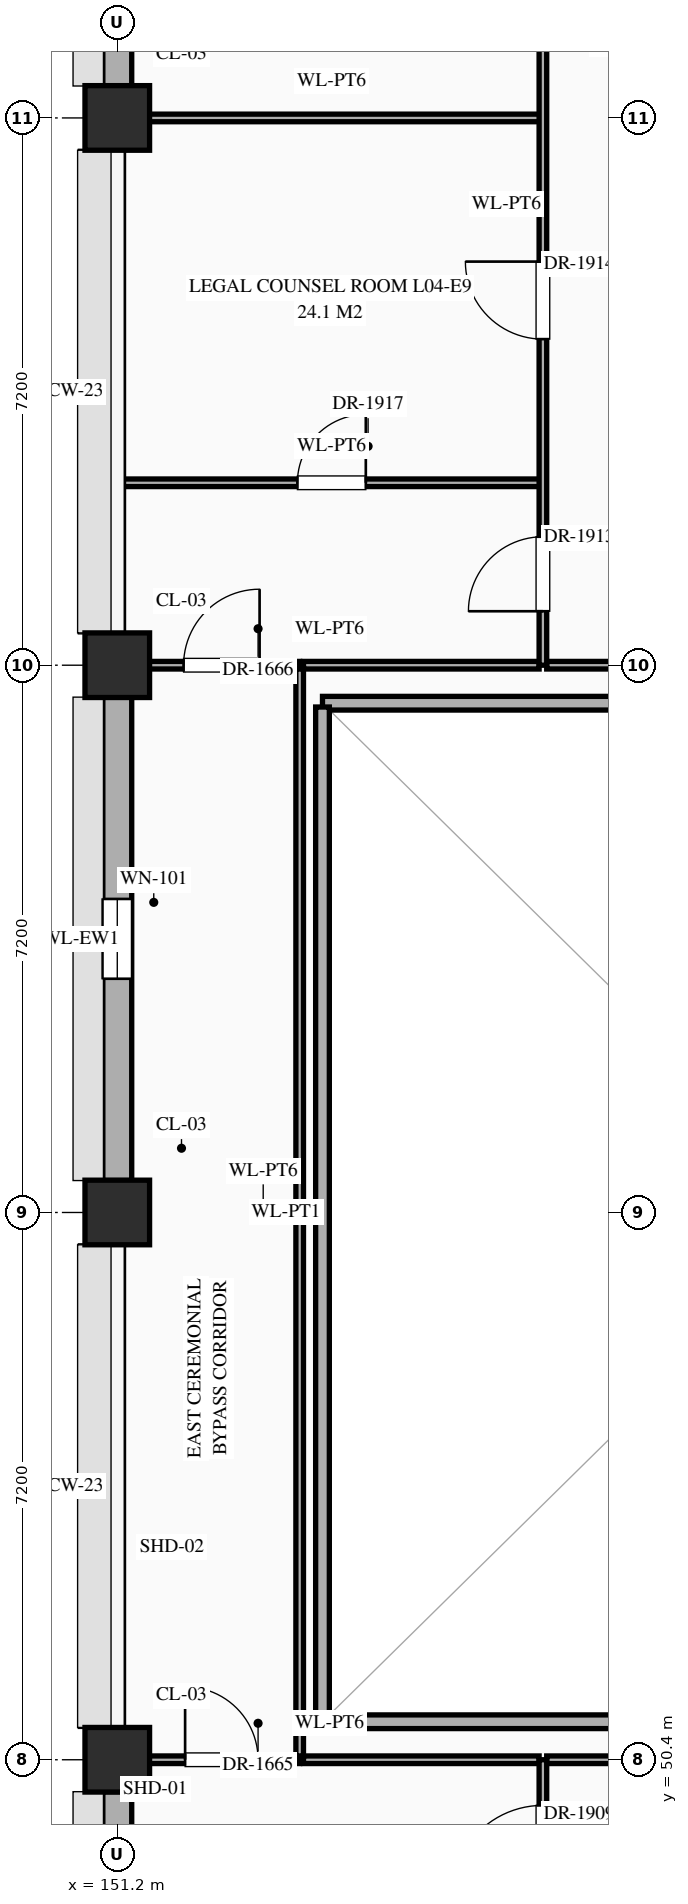
"""IFC4 building model, lengths in metres.
Left out: names, types, materials, properties, quantities, classifications, styles, units other than length and angle.
Written with IfcOpenShell. Run it as: python <this file> out.ifc"""

import sys

from ifc_helpers import new_model, si_unit, direction, frame, frame_2d, origin, origin_2d, place, context, subcontext, project, spatial, rectangle, extrude, element, fill, save


model = new_model("IFC4")
c1 = context("Model", 3, precision=1e-05, world=origin(), true_north=direction((0.0, 1.0)))
c2 = subcontext(c1, "Body", "Model", "MODEL_VIEW")
j1 = project(units=[si_unit("LENGTHUNIT", "METRE"), si_unit("PLANEANGLEUNIT", "RADIAN")], contexts=[c1])
p1 = place(None, origin())
s1 = spatial("IfcSite", under=j1, at=p1, CompositionType="ELEMENT")
p2 = place(p1, origin())
s2 = spatial("IfcBuilding", under=s1, at=p2, CompositionType="ELEMENT")
p3 = place(p2, frame((0.0, 0.0, 16.2)))
s3 = spatial("IfcBuildingStorey", under=s2, at=p3, CompositionType="ELEMENT", Elevation=16.2)
for number, where, z_axis, x_axis in (
    (1, (151.2, 50.4, 0.0), (0.0, 0.0, 1.0), (1.0, 0.0, 0.0)),
    (2, (151.2, 57.6, 0.0), (0.0, 0.0, 1.0), (1.0, 0.0, 0.0)),
    (3, (151.2, 64.8, 0.0), (0.0, 0.0, 1.0), (1.0, 0.0, 0.0)),
    (4, (151.2, 72.0, 0.0), (0.0, 0.0, 1.0), (1.0, 0.0, 0.0)),
):
    element("IfcColumn", number, at=place(p3, frame(where, z_axis=z_axis, x_axis=x_axis)), inside=s3, PredefinedType="COLUMN", context=c2, shape_type="SweptSolid", body=[
        extrude(rectangle(XDim=0.85, YDim=0.85, at=origin_2d()), origin(), (0.0, 0.0, 1.0), 5.4),
    ])
p4 = place(p3, frame((151.2, 43.62, 0.0), z_axis=(0.0, 0.0, 1.0), x_axis=(0.0, 1.0, 0.0)))
e5 = element("IfcWall", 5, at=p4, inside=s3, PredefinedType="STANDARD", context=c2, shape_type="SweptSolid", body=[
    extrude(rectangle(XDim=6.36, YDim=0.38, at=frame_2d((3.18, 0.0))), origin(), (0.0, 0.0, 1.0), 4.55),
])
p5 = place(p4, frame((2.655, 0.0, 0.85)))
e6 = element("IfcOpeningElement", 6, at=p5, cuts=e5, PredefinedType="OPENING", context=c2, shape_type="SweptSolid", body=[
    extrude(rectangle(XDim=1.05, YDim=1.2, at=frame_2d((0.525, 0.6))), frame((0.0, 0.202, 0.0), z_axis=(0.0, -1.0, 0.0), x_axis=(1.0, 0.0, 0.0)), (0.0, 0.0, 1.0), 0.404),
])
p6 = place(p3, frame((151.2, 58.02, 0.0), z_axis=(0.0, 0.0, 1.0), x_axis=(0.0, 1.0, 0.0)))
e7 = element("IfcWall", 7, at=p6, inside=s3, PredefinedType="STANDARD", context=c2, shape_type="SweptSolid", body=[
    extrude(rectangle(XDim=6.36, YDim=0.38, at=frame_2d((3.18, 0.0))), origin(), (0.0, 0.0, 1.0), 4.55),
])
p7 = place(p6, frame((2.655, 0.0, 0.85)))
e8 = element("IfcOpeningElement", 8, at=p7, cuts=e7, PredefinedType="OPENING", context=c2, shape_type="SweptSolid", body=[
    extrude(rectangle(XDim=1.05, YDim=1.56, at=frame_2d((0.525, 0.78))), frame((0.0, 0.202, 0.0), z_axis=(0.0, -1.0, 0.0), x_axis=(1.0, 0.0, 0.0)), (0.0, 0.0, 1.0), 0.404),
])
p8 = place(p3, frame((151.2, 72.42, 0.0), z_axis=(0.0, 0.0, 1.0), x_axis=(0.0, 1.0, 0.0)))
e9 = element("IfcWall", 9, at=p8, inside=s3, PredefinedType="STANDARD", context=c2, shape_type="SweptSolid", body=[
    extrude(rectangle(XDim=6.36, YDim=0.38, at=frame_2d((3.18, 0.0))), origin(), (0.0, 0.0, 1.0), 4.55),
])
p9 = place(p8, frame((2.655, 0.0, 0.85)))
e10 = element("IfcOpeningElement", 10, at=p9, cuts=e9, PredefinedType="OPENING", context=c2, shape_type="SweptSolid", body=[
    extrude(rectangle(XDim=1.05, YDim=1.92, at=frame_2d((0.525, 0.96))), frame((0.0, 0.202, 0.0), z_axis=(0.0, -1.0, 0.0), x_axis=(1.0, 0.0, 0.0)), (0.0, 0.0, 1.0), 0.404),
])
p10 = place(p3, frame((151.24, 50.4, 0.0), z_axis=(0.0, 0.0, 1.0), x_axis=(1.0, 0.0, 0.0)))
e11 = element("IfcWall", 11, at=p10, inside=s3, PredefinedType="STANDARD", context=c2, shape_type="SweptSolid", body=[
    extrude(rectangle(XDim=2.36, YDim=0.1, at=frame_2d((1.18, 0.0))), origin(), (0.0, 0.0, 1.0), 4.15),
])
p11 = place(p10, frame((0.853, 0.0, 0.0)))
e12 = element("IfcOpeningElement", 12, at=p11, cuts=e11, PredefinedType="OPENING", context=c2, shape_type="SweptSolid", body=[
    extrude(rectangle(XDim=0.96, YDim=2.2, at=frame_2d((0.48, 1.1))), frame((0.0, 0.062, 0.0), z_axis=(0.0, -1.0, 0.0), x_axis=(1.0, 0.0, 0.0)), (0.0, 0.0, 1.0), 0.124),
])
p12 = place(p3, frame((153.65, 50.4, 0.0), z_axis=(0.0, 0.0, 1.0), x_axis=(1.0, 0.0, 0.0)))
e13 = element("IfcWall", 13, at=p12, inside=s3, PredefinedType="STANDARD", context=c2, shape_type="SweptSolid", body=[
    extrude(rectangle(XDim=3.1, YDim=0.1, at=frame_2d((1.55, 0.0))), origin(), (0.0, 0.0, 1.0), 4.15),
])
p13 = place(p3, frame((156.85, 50.4, 0.0), z_axis=(0.0, 0.0, 1.0), x_axis=(1.0, 0.0, 0.0)))
e14 = element("IfcWall", 14, at=p13, inside=s3, PredefinedType="STANDARD", context=c2, shape_type="SweptSolid", body=[
    extrude(rectangle(XDim=2.7, YDim=0.1, at=frame_2d((1.35, 0.0))), origin(), (0.0, 0.0, 1.0), 4.15),
])
for number, where, z_axis, x_axis in (
    (15, (153.9, 50.9, 0.0), (0.0, 0.0, 1.0), (1.0, 0.0, 0.0)),
    (16, (153.9, 64.3, 0.0), (0.0, 0.0, 1.0), (1.0, 0.0, 0.0)),
):
    element("IfcWall", number, at=place(p3, frame(where, z_axis=z_axis, x_axis=x_axis)), inside=s3, PredefinedType="STANDARD", context=c2, shape_type="SweptSolid", body=[
        extrude(rectangle(XDim=13.6, YDim=0.18, at=frame_2d((6.8, 0.0))), origin(), (0.0, 0.0, 1.0), 5.2),
    ])
p14 = place(p3, frame((151.24, 64.8, 0.0), z_axis=(0.0, 0.0, 1.0), x_axis=(1.0, 0.0, 0.0)))
e17 = element("IfcWall", 17, at=p14, inside=s3, PredefinedType="STANDARD", context=c2, shape_type="SweptSolid", body=[
    extrude(rectangle(XDim=2.36, YDim=0.1, at=frame_2d((1.18, 0.0))), origin(), (0.0, 0.0, 1.0), 4.15),
])
p15 = place(p14, frame((0.833, 0.0, 0.0)))
e18 = element("IfcOpeningElement", 18, at=p15, cuts=e17, PredefinedType="OPENING", context=c2, shape_type="SweptSolid", body=[
    extrude(rectangle(XDim=1.0, YDim=2.25, at=frame_2d((0.5, 1.125))), frame((0.0, 0.062, 0.0), z_axis=(0.0, -1.0, 0.0), x_axis=(1.0, 0.0, 0.0)), (0.0, 0.0, 1.0), 0.124),
])
p16 = place(p3, frame((153.65, 64.8, 0.0), z_axis=(0.0, 0.0, 1.0), x_axis=(1.0, 0.0, 0.0)))
e19 = element("IfcWall", 19, at=p16, inside=s3, PredefinedType="STANDARD", context=c2, shape_type="SweptSolid", body=[
    extrude(rectangle(XDim=3.1, YDim=0.1, at=frame_2d((1.55, 0.0))), origin(), (0.0, 0.0, 1.0), 4.15),
])
p17 = place(p3, frame((156.85, 64.8, 0.0), z_axis=(0.0, 0.0, 1.0), x_axis=(1.0, 0.0, 0.0)))
e20 = element("IfcWall", 20, at=p17, inside=s3, PredefinedType="STANDARD", context=c2, shape_type="SweptSolid", body=[
    extrude(rectangle(XDim=2.7, YDim=0.1, at=frame_2d((1.35, 0.0))), origin(), (0.0, 0.0, 1.0), 4.15),
])
p18 = place(p3, frame((151.24, 67.2, 0.0), z_axis=(0.0, 0.0, 1.0), x_axis=(1.0, 0.0, 0.0)))
e21 = element("IfcWall", 21, at=p18, inside=s3, PredefinedType="STANDARD", context=c2, shape_type="SweptSolid", body=[
    extrude(rectangle(XDim=5.56, YDim=0.1, at=frame_2d((2.78, 0.0))), origin(), (0.0, 0.0, 1.0), 5.2),
])
p19 = place(p18, frame((2.33, 0.0, 0.0)))
e22 = element("IfcOpeningElement", 22, at=p19, cuts=e21, PredefinedType="OPENING", context=c2, shape_type="SweptSolid", body=[
    extrude(rectangle(XDim=0.9, YDim=2.15, at=frame_2d((0.45, 1.075))), frame((0.0, 0.062, 0.0), z_axis=(0.0, -1.0, 0.0), x_axis=(1.0, 0.0, 0.0)), (0.0, 0.0, 1.0), 0.124),
])
p20 = place(p3, frame((151.24, 72.0, 0.0), z_axis=(0.0, 0.0, 1.0), x_axis=(1.0, 0.0, 0.0)))
e23 = element("IfcWall", 23, at=p20, inside=s3, PredefinedType="STANDARD", context=c2, shape_type="SweptSolid", body=[
    extrude(rectangle(XDim=5.56, YDim=0.1, at=frame_2d((2.78, 0.0))), origin(), (0.0, 0.0, 1.0), 4.15),
])
p21 = place(p3, frame((153.6, 50.45, 0.0), z_axis=(0.0, 0.0, 1.0), x_axis=(0.0, 1.0, 0.0)))
e24 = element("IfcWall", 24, at=p21, inside=s3, PredefinedType="STANDARD", context=c2, shape_type="SweptSolid", body=[
    extrude(rectangle(XDim=14.3, YDim=0.1, at=frame_2d((7.15, 0.0))), origin(), (0.0, 0.0, 1.0), 5.2),
])
p22 = place(p3, frame((153.9, 50.95, 0.0), z_axis=(0.0, 0.0, 1.0), x_axis=(0.0, 1.0, 0.0)))
e25 = element("IfcWall", 25, at=p22, inside=s3, PredefinedType="STANDARD", context=c2, shape_type="SweptSolid", body=[
    extrude(rectangle(XDim=13.3, YDim=0.18, at=frame_2d((6.65, 0.0))), origin(), (0.0, 0.0, 1.0), 5.2),
])
p23 = place(p3, frame((156.8, 43.2, 0.0), z_axis=(0.0, 0.0, 1.0), x_axis=(0.0, 1.0, 0.0)))
e26 = element("IfcWall", 26, at=p23, inside=s3, PredefinedType="STANDARD", context=c2, shape_type="SweptSolid", body=[
    extrude(rectangle(XDim=7.2, YDim=0.1, at=frame_2d((3.6, 0.0))), origin(), (0.0, 0.0, 1.0), 5.2),
])
p24 = place(p23, frame((5.4, 0.0, 0.0)))
e27 = element("IfcOpeningElement", 27, at=p24, cuts=e26, PredefinedType="OPENING", context=c2, shape_type="SweptSolid", body=[
    extrude(rectangle(XDim=1.2, YDim=2.35, at=frame_2d((0.6, 1.175))), frame((0.0, 0.062, 0.0), z_axis=(0.0, -1.0, 0.0), x_axis=(1.0, 0.0, 0.0)), (0.0, 0.0, 1.0), 0.124),
])
p25 = place(p23, frame((1.78, 0.0, 0.0)))
e28 = element("IfcOpeningElement", 28, at=p25, cuts=e26, PredefinedType="OPENING", context=c2, shape_type="SweptSolid", body=[
    extrude(rectangle(XDim=1.24, YDim=2.3, at=frame_2d((0.62, 1.15))), frame((0.0, 0.062, 0.0), z_axis=(0.0, -1.0, 0.0), x_axis=(1.0, 0.0, 0.0)), (0.0, 0.0, 1.0), 0.124),
])
p26 = place(p3, frame((156.8, 64.8, 0.0), z_axis=(0.0, 0.0, 1.0), x_axis=(0.0, 1.0, 0.0)))
e29 = element("IfcWall", 29, at=p26, inside=s3, PredefinedType="STANDARD", context=c2, shape_type="SweptSolid", body=[
    extrude(rectangle(XDim=19.2, YDim=0.1, at=frame_2d((9.6, 0.0))), origin(), (0.0, 0.0, 1.0), 5.2),
])
p27 = place(p26, frame((16.31, 0.0, 0.0)))
e30 = element("IfcOpeningElement", 30, at=p27, cuts=e29, PredefinedType="OPENING", context=c2, shape_type="SweptSolid", body=[
    extrude(rectangle(XDim=0.98, YDim=2.35, at=frame_2d((0.49, 1.175))), frame((0.0, 0.062, 0.0), z_axis=(0.0, -1.0, 0.0), x_axis=(1.0, 0.0, 0.0)), (0.0, 0.0, 1.0), 0.124),
])
p28 = place(p26, frame((0.71, 0.0, 0.0)))
e31 = element("IfcOpeningElement", 31, at=p28, cuts=e29, PredefinedType="OPENING", context=c2, shape_type="SweptSolid", body=[
    extrude(rectangle(XDim=0.98, YDim=2.35, at=frame_2d((0.49, 1.175))), frame((0.0, 0.062, 0.0), z_axis=(0.0, -1.0, 0.0), x_axis=(1.0, 0.0, 0.0)), (0.0, 0.0, 1.0), 0.124),
])
p29 = place(p26, frame((4.29, 0.0, 0.0)))
e32 = element("IfcOpeningElement", 32, at=p29, cuts=e29, PredefinedType="OPENING", context=c2, shape_type="SweptSolid", body=[
    extrude(rectangle(XDim=1.02, YDim=2.4, at=frame_2d((0.51, 1.2))), frame((0.0, 0.062, 0.0), z_axis=(0.0, -1.0, 0.0), x_axis=(1.0, 0.0, 0.0)), (0.0, 0.0, 1.0), 0.124),
])
p30 = place(p26, frame((10.27, 0.0, 0.0)))
e33 = element("IfcOpeningElement", 33, at=p30, cuts=e29, PredefinedType="OPENING", context=c2, shape_type="SweptSolid", body=[
    extrude(rectangle(XDim=1.06, YDim=2.4, at=frame_2d((0.53, 1.2))), frame((0.0, 0.062, 0.0), z_axis=(0.0, -1.0, 0.0), x_axis=(1.0, 0.0, 0.0)), (0.0, 0.0, 1.0), 0.124),
])
p31 = place(p7, origin())
e34 = element("IfcWindow", 34, at=p31, inside=s3, PartitioningType="SINGLE_PANEL", PredefinedType="WINDOW", context=c2, shape_type="SweptSolid", body=[
    extrude(rectangle(XDim=1.05, YDim=1.56, at=frame_2d((0.525, 0.78))), frame((0.0, 0.03, 0.0), z_axis=(0.0, -1.0, 0.0), x_axis=(1.0, 0.0, 0.0)), (0.0, 0.0, 1.0), 0.06),
])
fill(e8, e34)
p32 = place(p11, origin())
e35 = element("IfcDoor", 35, at=p32, inside=s3, OperationType="SINGLE_SWING_LEFT", PredefinedType="DOOR", context=c2, shape_type="SweptSolid", body=[
    extrude(rectangle(XDim=0.96, YDim=2.2, at=frame_2d((0.48, 1.1))), frame((0.0, 0.025, 0.0), z_axis=(0.0, -1.0, 0.0), x_axis=(1.0, 0.0, 0.0)), (0.0, 0.0, 1.0), 0.05),
])
fill(e12, e35)
p33 = place(p15, origin())
e36 = element("IfcDoor", 36, at=p33, inside=s3, OperationType="SINGLE_SWING_RIGHT", PredefinedType="DOOR", context=c2, shape_type="SweptSolid", body=[
    extrude(rectangle(XDim=1.0, YDim=2.25, at=frame_2d((0.5, 1.125))), frame((0.0, 0.025, 0.0), z_axis=(0.0, -1.0, 0.0), x_axis=(1.0, 0.0, 0.0)), (0.0, 0.0, 1.0), 0.05),
])
fill(e18, e36)
p34 = place(p24, origin())
e37 = element("IfcDoor", 37, at=p34, inside=s3, OperationType="SINGLE_SWING_LEFT", PredefinedType="DOOR", context=c2, shape_type="SweptSolid", body=[
    extrude(rectangle(XDim=1.2, YDim=2.35, at=frame_2d((0.6, 1.175))), frame((0.0, 0.025, 0.0), z_axis=(0.0, -1.0, 0.0), x_axis=(1.0, 0.0, 0.0)), (0.0, 0.0, 1.0), 0.05),
])
fill(e27, e37)
p35 = place(p28, origin())
e38 = element("IfcDoor", 38, at=p35, inside=s3, OperationType="SINGLE_SWING_LEFT", PredefinedType="DOOR", context=c2, shape_type="SweptSolid", body=[
    extrude(rectangle(XDim=0.98, YDim=2.35, at=frame_2d((0.49, 1.175))), frame((0.0, 0.025, 0.0), z_axis=(0.0, -1.0, 0.0), x_axis=(1.0, 0.0, 0.0)), (0.0, 0.0, 1.0), 0.05),
])
fill(e31, e38)
p36 = place(p29, origin())
e39 = element("IfcDoor", 39, at=p36, inside=s3, OperationType="SINGLE_SWING_RIGHT", PredefinedType="DOOR", context=c2, shape_type="SweptSolid", body=[
    extrude(rectangle(XDim=1.02, YDim=2.4, at=frame_2d((0.51, 1.2))), frame((0.0, 0.025, 0.0), z_axis=(0.0, -1.0, 0.0), x_axis=(1.0, 0.0, 0.0)), (0.0, 0.0, 1.0), 0.05),
])
fill(e32, e39)
p37 = place(p19, origin())
e40 = element("IfcDoor", 40, at=p37, inside=s3, OperationType="SINGLE_SWING_RIGHT", PredefinedType="DOOR", context=c2, shape_type="SweptSolid", body=[
    extrude(rectangle(XDim=0.9, YDim=2.15, at=frame_2d((0.45, 1.075))), frame((0.0, 0.025, 0.0), z_axis=(0.0, -1.0, 0.0), x_axis=(1.0, 0.0, 0.0)), (0.0, 0.0, 1.0), 0.05),
])
fill(e22, e40)
save(model, sys.argv[1])
